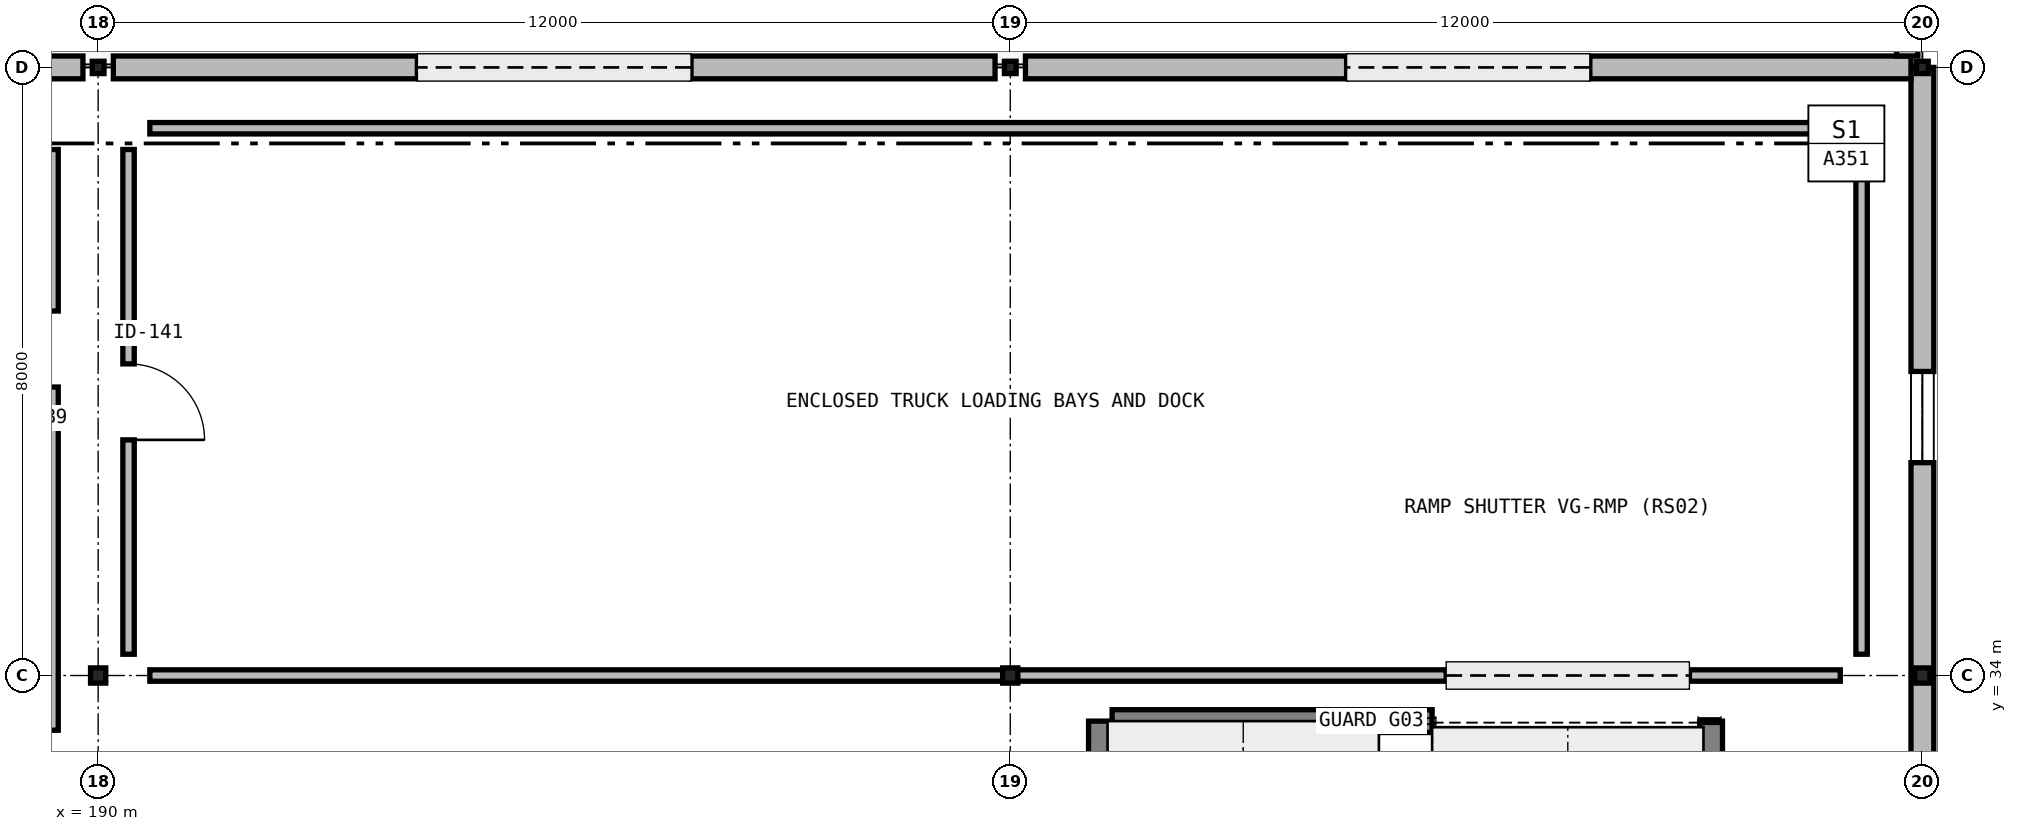
"""IFC4 building model, lengths in metres.
Left out: names, types, materials, properties, quantities, classifications, styles, units other than length and angle.
Written with IfcOpenShell. Run it as: python <this file> out.ifc"""

import sys

from ifc_helpers import new_model, si_unit, direction, frame, frame_2d, origin, origin_2d_with_axis, place, context, subcontext, project, spatial, rectangle, hollow_rectangle, i_section, extrude, element, fill, save


model = new_model("IFC4")
c1 = context("Model", 3, precision=1e-05, world=origin(), true_north=direction((0.0, 1.0)))
c2 = subcontext(c1, "Body", "Model", "MODEL_VIEW")
j1 = project(units=[si_unit("LENGTHUNIT", "METRE"), si_unit("PLANEANGLEUNIT", "RADIAN")], contexts=[c1])
p1 = place(None, origin())
s1 = spatial("IfcSite", under=j1, at=p1, CompositionType="ELEMENT")
p2 = place(p1, origin())
s2 = spatial("IfcBuilding", under=s1, at=p2, CompositionType="ELEMENT")
p3 = place(p2, origin())
s3 = spatial("IfcBuildingStorey", under=s2, at=p3, CompositionType="ELEMENT", Elevation=0.0)
p4 = place(p3, frame((190.0, 34.0, 0.0), z_axis=(0.0, 0.0, 1.0), x_axis=(1.0, 0.0, 0.0)))
e1 = element("IfcColumn", 1, at=p4, inside=s3, PredefinedType="COLUMN", context=c2, shape_type="SweptSolid", body=[
    extrude(hollow_rectangle(XDim=0.2, YDim=0.2, WallThickness=0.008, InnerFilletRadius=0.008, OuterFilletRadius=0.016, at=origin_2d_with_axis()), origin(), (0.0, 0.0, 1.0), 4.63),
])
p5 = place(p3, frame((190.0, 42.0, -0.28), z_axis=(0.0, 0.0, 1.0), x_axis=(1.0, 0.0, 0.0)))
e2 = element("IfcColumn", 2, at=p5, inside=s3, PredefinedType="COLUMN", context=c2, shape_type="SweptSolid", body=[
    extrude(i_section(OverallWidth=0.154, OverallDepth=0.162, WebThickness=0.008, FlangeThickness=0.011, FilletRadius=0.009, at=origin_2d_with_axis()), origin(), (0.0, 0.0, 1.0), 4.91),
])
p6 = place(p3, frame((202.0, 34.0, 0.0), z_axis=(0.0, 0.0, 1.0), x_axis=(1.0, 0.0, 0.0)))
e3 = element("IfcColumn", 3, at=p6, inside=s3, PredefinedType="COLUMN", context=c2, shape_type="SweptSolid", body=[
    extrude(hollow_rectangle(XDim=0.2, YDim=0.2, WallThickness=0.008, InnerFilletRadius=0.008, OuterFilletRadius=0.016, at=origin_2d_with_axis()), origin(), (0.0, 0.0, 1.0), 4.63),
])
p7 = place(p3, frame((202.0, 42.0, -0.28), z_axis=(0.0, 0.0, 1.0), x_axis=(1.0, 0.0, 0.0)))
e4 = element("IfcColumn", 4, at=p7, inside=s3, PredefinedType="COLUMN", context=c2, shape_type="SweptSolid", body=[
    extrude(i_section(OverallWidth=0.154, OverallDepth=0.162, WebThickness=0.008, FlangeThickness=0.011, FilletRadius=0.009, at=origin_2d_with_axis()), origin(), (0.0, 0.0, 1.0), 4.91),
])
p8 = place(p3, frame((214.0, 34.0, 0.0), z_axis=(0.0, 0.0, 1.0), x_axis=(1.0, 0.0, 0.0)))
e5 = element("IfcColumn", 5, at=p8, inside=s3, PredefinedType="COLUMN", context=c2, shape_type="SweptSolid", body=[
    extrude(hollow_rectangle(XDim=0.2, YDim=0.2, WallThickness=0.008, InnerFilletRadius=0.008, OuterFilletRadius=0.016, at=origin_2d_with_axis()), origin(), (0.0, 0.0, 1.0), 4.63),
])
p9 = place(p3, frame((214.0, 42.0, -0.28), z_axis=(0.0, 0.0, 1.0), x_axis=(1.0, 0.0, 0.0)))
e6 = element("IfcColumn", 6, at=p9, inside=s3, PredefinedType="COLUMN", context=c2, shape_type="SweptSolid", body=[
    extrude(i_section(OverallWidth=0.154, OverallDepth=0.162, WebThickness=0.008, FlangeThickness=0.011, FilletRadius=0.009, at=origin_2d_with_axis()), origin(), (0.0, 0.0, 1.0), 4.91),
])
p10 = place(p3, frame((214.0, 14.0, 0.0), z_axis=(0.0, 0.0, 1.0), x_axis=(0.0, 1.0, 0.0)))
e7 = element("IfcWall", 7, at=p10, inside=s3, PredefinedType="SOLIDWALL", context=c2, shape_type="SweptSolid", body=[
    extrude(rectangle(XDim=28.0, YDim=0.3, at=frame_2d((14.0, 0.0), x_axis=(1.0, 0.0))), origin(), (0.0, 0.0, 1.0), 4.18),
])
p11 = place(p10, frame((8.0, 0.0, 2.5)))
e8 = element("IfcOpeningElement", 8, at=p11, cuts=e7, PredefinedType="OPENING", context=c2, shape_type="SweptSolid", body=[
    extrude(rectangle(XDim=1.2, YDim=1.3, at=frame_2d((0.6, 0.65), x_axis=(1.0, 0.0))), frame((0.0, 0.16, 0.0), z_axis=(0.0, -1.0, 0.0), x_axis=(1.0, 0.0, 0.0)), (0.0, 0.0, 1.0), 0.32),
])
p12 = place(p10, frame((22.8, 0.0, 2.3)))
e9 = element("IfcOpeningElement", 9, at=p12, cuts=e7, PredefinedType="OPENING", context=c2, shape_type="SweptSolid", body=[
    extrude(rectangle(XDim=1.2, YDim=1.3, at=frame_2d((0.6, 0.65), x_axis=(1.0, 0.0))), frame((0.0, 0.16, 0.0), z_axis=(0.0, -1.0, 0.0), x_axis=(1.0, 0.0, 0.0)), (0.0, 0.0, 1.0), 0.32),
])
p13 = place(p3, frame((189.8, 42.0, 0.0), z_axis=(0.0, 0.0, 1.0), x_axis=(-1.0, 0.0, 0.0)))
e10 = element("IfcWall", 10, at=p13, inside=s3, PredefinedType="SOLIDWALL", context=c2, shape_type="SweptSolid", body=[
    extrude(rectangle(XDim=11.65, YDim=0.3, at=frame_2d((5.825, 0.0), x_axis=(1.0, 0.0))), origin(), (0.0, 0.0, 1.0), 4.15),
])
p14 = place(p13, frame((4.025, 0.0, 0.0)))
e11 = element("IfcOpeningElement", 11, at=p14, cuts=e10, PredefinedType="OPENING", context=c2, shape_type="SweptSolid", body=[
    extrude(rectangle(XDim=3.6, YDim=3.6, at=frame_2d((1.8, 1.8), x_axis=(1.0, 0.0))), frame((0.0, 0.16, 0.0), z_axis=(0.0, -1.0, 0.0), x_axis=(1.0, 0.0, 0.0)), (0.0, 0.0, 1.0), 0.32),
])
p15 = place(p3, frame((201.8, 42.0, 0.0), z_axis=(0.0, 0.0, 1.0), x_axis=(-1.0, 0.0, 0.0)))
e12 = element("IfcWall", 12, at=p15, inside=s3, PredefinedType="SOLIDWALL", context=c2, shape_type="SweptSolid", body=[
    extrude(rectangle(XDim=11.6, YDim=0.3, at=frame_2d((5.8, 0.0), x_axis=(1.0, 0.0))), origin(), (0.0, 0.0, 1.0), 4.15),
])
p16 = place(p15, frame((4.0, 0.0, 0.0)))
e13 = element("IfcOpeningElement", 13, at=p16, cuts=e12, PredefinedType="OPENING", context=c2, shape_type="SweptSolid", body=[
    extrude(rectangle(XDim=3.6, YDim=3.6, at=frame_2d((1.8, 1.8), x_axis=(1.0, 0.0))), frame((0.0, 0.16, 0.0), z_axis=(0.0, -1.0, 0.0), x_axis=(1.0, 0.0, 0.0)), (0.0, 0.0, 1.0), 0.32),
])
p17 = place(p3, frame((213.85, 42.0, 0.0), z_axis=(0.0, 0.0, 1.0), x_axis=(-1.0, 0.0, 0.0)))
e14 = element("IfcWall", 14, at=p17, inside=s3, PredefinedType="SOLIDWALL", context=c2, shape_type="SweptSolid", body=[
    extrude(rectangle(XDim=11.65, YDim=0.3, at=frame_2d((5.825, 0.0), x_axis=(1.0, 0.0))), origin(), (0.0, 0.0, 1.0), 4.15),
])
p18 = place(p17, frame((4.225, 0.0, 0.0)))
e15 = element("IfcOpeningElement", 15, at=p18, cuts=e14, PredefinedType="OPENING", context=c2, shape_type="SweptSolid", body=[
    extrude(rectangle(XDim=3.2, YDim=3.2, at=frame_2d((1.6, 1.6), x_axis=(1.0, 0.0))), frame((0.0, 0.16, 0.0), z_axis=(0.0, -1.0, 0.0), x_axis=(1.0, 0.0, 0.0)), (0.0, 0.0, 1.0), 0.32),
])
p19 = place(p3, frame((213.8, 42.15, 0.0), z_axis=(0.0, 0.0, 1.0), x_axis=(0.0, 1.0, 0.0)))
e16 = element("IfcWall", 16, at=p19, inside=s3, PredefinedType="SOLIDWALL", context=c2, shape_type="SweptSolid", body=[
    extrude(rectangle(XDim=31.45, YDim=0.28, at=frame_2d((15.725, 0.0), x_axis=(1.0, 0.0))), origin(), (0.0, 0.0, 1.0), 3.9),
])
for number, where, z_axis, x_axis in (
    (17, (203.18, 15.0, 0.0), (0.0, 0.0, 1.0), (0.0, 1.0, 0.0)),
    (18, (211.22, 33.4, 0.0), (0.0, 0.0, 1.0), (0.0, -1.0, 0.0)),
):
    element("IfcWall", number, at=place(p3, frame(where, z_axis=z_axis, x_axis=x_axis)), inside=s3, PredefinedType="SHEAR", context=c2, shape_type="SweptSolid", body=[
        extrude(rectangle(XDim=18.4, YDim=0.3, at=frame_2d((9.2, 0.0), x_axis=(1.0, 0.0))), origin(), (0.0, 0.0, 1.0), 4.18),
    ])
p20 = place(p3, frame((203.34, 33.4, 0.0), z_axis=(0.0, 0.0, 1.0), x_axis=(1.0, 0.0, 0.0)))
e19 = element("IfcWall", 19, at=p20, inside=s3, PredefinedType="SHEAR", context=c2, shape_type="SweptSolid", body=[
    extrude(rectangle(XDim=4.21, YDim=0.3, at=frame_2d((2.105, 0.0), x_axis=(1.0, 0.0))), origin(), (0.0, 0.0, 1.0), 4.18),
])
p21 = place(p3, frame((190.68, 34.0, 0.0), z_axis=(0.0, 0.0, 1.0), x_axis=(1.0, 0.0, 0.0)))
e20 = element("IfcWall", 20, at=p21, inside=s3, PredefinedType="PARTITIONING", context=c2, shape_type="SweptSolid", body=[
    extrude(rectangle(XDim=22.24, YDim=0.15, at=frame_2d((11.12, 0.0), x_axis=(1.0, 0.0))), origin(), (0.0, 0.0, 1.0), 3.62),
])
p22 = place(p21, frame((17.055, 0.0, 0.0)))
e21 = element("IfcOpeningElement", 21, at=p22, cuts=e20, PredefinedType="OPENING", context=c2, shape_type="SweptSolid", body=[
    extrude(rectangle(XDim=3.2, YDim=3.2, at=frame_2d((1.6, 1.6), x_axis=(1.0, 0.0))), frame((0.0, 0.085, 0.0), z_axis=(0.0, -1.0, 0.0), x_axis=(1.0, 0.0, 0.0)), (0.0, 0.0, 1.0), 0.17),
])
p23 = place(p3, frame((213.2, 34.28, 0.0), z_axis=(0.0, 0.0, 1.0), x_axis=(0.0, 1.0, 0.0)))
e22 = element("IfcWall", 22, at=p23, inside=s3, PredefinedType="PARTITIONING", context=c2, shape_type="SweptSolid", body=[
    extrude(rectangle(XDim=6.64, YDim=0.15, at=frame_2d((3.32, 0.0), x_axis=(1.0, 0.0))), origin(), (0.0, 0.0, 1.0), 3.62),
])
p24 = place(p3, frame((212.92, 41.2, 0.0), z_axis=(0.0, 0.0, 1.0), x_axis=(-1.0, 0.0, 0.0)))
e23 = element("IfcWall", 23, at=p24, inside=s3, PredefinedType="PARTITIONING", context=c2, shape_type="SweptSolid", body=[
    extrude(rectangle(XDim=22.24, YDim=0.15, at=frame_2d((11.12, 0.0), x_axis=(1.0, 0.0))), origin(), (0.0, 0.0, 1.0), 3.62),
])
p25 = place(p3, frame((190.4, 40.92, 0.0), z_axis=(0.0, 0.0, 1.0), x_axis=(0.0, -1.0, 0.0)))
e24 = element("IfcWall", 24, at=p25, inside=s3, PredefinedType="PARTITIONING", context=c2, shape_type="SweptSolid", body=[
    extrude(rectangle(XDim=6.64, YDim=0.15, at=frame_2d((3.32, 0.0), x_axis=(1.0, 0.0))), origin(), (0.0, 0.0, 1.0), 3.62),
])
p26 = place(p25, frame((2.82, 0.0, 0.0)))
e25 = element("IfcOpeningElement", 25, at=p26, cuts=e24, PredefinedType="OPENING", context=c2, shape_type="SweptSolid", body=[
    extrude(rectangle(XDim=1.0, YDim=2.15, at=frame_2d((0.5, 1.075), x_axis=(1.0, 0.0))), frame((0.0, 0.085, 0.0), z_axis=(0.0, -1.0, 0.0), x_axis=(1.0, 0.0, 0.0)), (0.0, 0.0, 1.0), 0.17),
])
p27 = place(p3, frame((189.4, 33.28, 0.0), z_axis=(0.0, 0.0, 1.0), x_axis=(0.0, 1.0, 0.0)))
e26 = element("IfcWall", 26, at=p27, inside=s3, PredefinedType="PARTITIONING", context=c2, shape_type="SweptSolid", body=[
    extrude(rectangle(XDim=7.64, YDim=0.15, at=frame_2d((3.82, 0.0), x_axis=(1.0, 0.0))), origin(), (0.0, 0.0, 1.0), 3.62),
])
p28 = place(p27, frame((4.515, 0.0, 0.0)))
e27 = element("IfcOpeningElement", 27, at=p28, cuts=e26, PredefinedType="OPENING", context=c2, shape_type="SweptSolid", body=[
    extrude(rectangle(XDim=1.0, YDim=2.15, at=frame_2d((0.5, 1.075), x_axis=(1.0, 0.0))), frame((0.0, 0.085, 0.0), z_axis=(0.0, -1.0, 0.0), x_axis=(1.0, 0.0, 0.0)), (0.0, 0.0, 1.0), 0.17),
])
p29 = place(p12, origin())
e28 = element("IfcWindow", 28, at=p29, inside=s3, PartitioningType="SINGLE_PANEL", PredefinedType="WINDOW", context=c2, shape_type="SweptSolid", body=[
    extrude(rectangle(XDim=1.2, YDim=1.3, at=frame_2d((0.6, 0.65), x_axis=(1.0, 0.0))), frame((0.0, 0.03, 0.0), z_axis=(0.0, -1.0, 0.0), x_axis=(1.0, 0.0, 0.0)), (0.0, 0.0, 1.0), 0.06),
])
fill(e9, e28)
p30 = place(p16, origin())
e29 = element("IfcDoor", 29, at=p30, inside=s3, OperationType="ROLLINGUP", PredefinedType="DOOR", context=c2, shape_type="SweptSolid", body=[
    extrude(rectangle(XDim=3.6, YDim=3.6, at=frame_2d((1.8, 1.8), x_axis=(1.0, 0.0))), frame((0.0, 0.025, 0.0), z_axis=(0.0, -1.0, 0.0), x_axis=(1.0, 0.0, 0.0)), (0.0, 0.0, 1.0), 0.05),
])
fill(e13, e29)
p31 = place(p18, origin())
e30 = element("IfcDoor", 30, at=p31, inside=s3, OperationType="ROLLINGUP", PredefinedType="DOOR", context=c2, shape_type="SweptSolid", body=[
    extrude(rectangle(XDim=3.2, YDim=3.2, at=frame_2d((1.6, 1.6), x_axis=(1.0, 0.0))), frame((0.0, 0.025, 0.0), z_axis=(0.0, -1.0, 0.0), x_axis=(1.0, 0.0, 0.0)), (0.0, 0.0, 1.0), 0.05),
])
fill(e15, e30)
p32 = place(p22, origin())
e31 = element("IfcDoor", 31, at=p32, inside=s3, OperationType="ROLLINGUP", PredefinedType="DOOR", context=c2, shape_type="SweptSolid", body=[
    extrude(rectangle(XDim=3.2, YDim=3.2, at=frame_2d((1.6, 1.6), x_axis=(1.0, 0.0))), frame((0.0, 0.025, 0.0), z_axis=(0.0, -1.0, 0.0), x_axis=(1.0, 0.0, 0.0)), (0.0, 0.0, 1.0), 0.05),
])
fill(e21, e31)
p33 = place(p26, origin())
e32 = element("IfcDoor", 32, at=p33, inside=s3, OperationType="SINGLE_SWING_RIGHT", PredefinedType="DOOR", context=c2, shape_type="SweptSolid", body=[
    extrude(rectangle(XDim=1.0, YDim=2.15, at=frame_2d((0.5, 1.075), x_axis=(1.0, 0.0))), frame((0.0, 0.025, 0.0), z_axis=(0.0, -1.0, 0.0), x_axis=(1.0, 0.0, 0.0)), (0.0, 0.0, 1.0), 0.05),
])
fill(e25, e32)
p34 = place(p28, origin())
e33 = element("IfcDoor", 33, at=p34, inside=s3, OperationType="SINGLE_SWING_RIGHT", PredefinedType="DOOR", context=c2, shape_type="SweptSolid", body=[
    extrude(rectangle(XDim=1.0, YDim=2.15, at=frame_2d((0.5, 1.075), x_axis=(1.0, 0.0))), frame((0.0, 0.025, 0.0), z_axis=(0.0, -1.0, 0.0), x_axis=(1.0, 0.0, 0.0)), (0.0, 0.0, 1.0), 0.05),
])
fill(e27, e33)
save(model, sys.argv[1])
